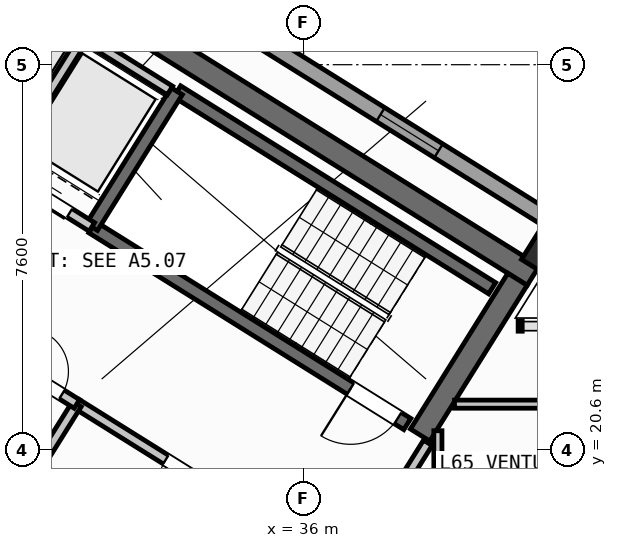
"""IFC4 building model, lengths in metres.
Left out: names, types, materials, properties, quantities, classifications, styles, units other than length and angle.
Written with IfcOpenShell. Run it as: python <this file> out.ifc"""

import sys

from ifc_helpers import new_model, si_unit, direction, frame, frame_2d, origin, origin_2d, place, context, subcontext, project, spatial, rectangle, hollow_rectangle, extrude, source, transform, mapped, element, fill, save


model = new_model("IFC4")
c1 = context("Model", 3, precision=1e-05, world=origin(), true_north=direction((0.0, 1.0)))
c2 = subcontext(c1, "Body", "Model", "MODEL_VIEW")
j1 = project(units=[si_unit("LENGTHUNIT", "METRE"), si_unit("PLANEANGLEUNIT", "RADIAN")], contexts=[c1])
p1 = place(None, origin())
s1 = spatial("IfcSite", under=j1, at=p1, CompositionType="ELEMENT")
p2 = place(p1, origin())
s2 = spatial("IfcBuilding", under=s1, at=p2, CompositionType="ELEMENT")
p3 = place(p2, frame((0.0, 0.0, 259.2)))
s3 = spatial("IfcBuildingStorey", under=s2, at=p3, CompositionType="ELEMENT", Elevation=259.2)
p4 = place(p3, frame((40.531, 24.036, 0.0), z_axis=(0.0, 0.0, 1.0), x_axis=(-0.848048787466, 0.529918157905, 0.0)))
e1 = element("IfcWall", 1, at=p4, inside=s3, PredefinedType="SHEAR", context=c2, shape_type="SweptSolid", body=[
    extrude(rectangle(XDim=13.04, YDim=0.45, at=frame_2d((6.52, 0.0))), origin(), (0.0, 0.0, 1.0), 3.35),
])
p5 = place(p3, frame((40.221, 23.965, 0.0), z_axis=(0.0, 0.0, 1.0), x_axis=(-0.529902075036, -0.848058836916, 0.0)))
e2 = element("IfcWall", 2, at=p5, inside=s3, PredefinedType="SHEAR", context=c2, shape_type="SweptSolid", body=[
    extrude(rectangle(XDim=3.625, YDim=0.45, at=frame_2d((1.812, 0.0))), origin(), (0.0, 0.0, 1.0), 3.35),
])
m1 = source(origin(), c2, "Body", "SweptSolid", [
    extrude(hollow_rectangle(XDim=0.7, YDim=0.7, WallThickness=0.028, at=origin_2d()), origin(), (0.0, 0.0, 1.0), 3.6),
])
p6 = place(p3, frame((40.783, 24.469, 0.0), z_axis=(0.0, 0.0, 1.0), x_axis=(-0.848048096156, 0.529919264233, 0.0)))
e3 = element("IfcColumn", 3, at=p6, inside=s3, PredefinedType="COLUMN", context=c2, shape_type="MappedRepresentation", body=[
    mapped(m1, transform((0.0, 0.0, 0.0), scale=1.0)),
])
p7 = place(p3, frame((14.138, 41.825, 0.0), z_axis=(0.0, 0.0, 1.0), x_axis=(0.848046498049, -0.529921821731, 0.0)))
e4 = element("IfcWall", 4, at=p7, inside=s3, PredefinedType="STANDARD", context=c2, shape_type="SweptSolid", body=[
    extrude(rectangle(XDim=31.588, YDim=0.32, at=frame_2d((15.794, 0.0))), origin(), (0.0, 0.0, 1.0), 3.35),
])
p8 = place(p7, frame((9.753, 0.0, 0.0)))
e5 = element("IfcOpeningElement", 5, at=p8, cuts=e4, PredefinedType="OPENING", context=c2, shape_type="SweptSolid", body=[
    extrude(rectangle(XDim=1.05, YDim=2.15, at=frame_2d((0.525, 1.075))), frame((0.0, 0.17, 0.0), z_axis=(0.0, -1.0, 0.0), x_axis=(1.0, 0.0, 0.0)), (0.0, 0.0, 1.0), 0.34),
])
p9 = place(p7, frame((0.816, 0.0, 0.9)))
e6 = element("IfcOpeningElement", 6, at=p9, cuts=e4, PredefinedType="OPENING", context=c2, shape_type="SweptSolid", body=[
    extrude(rectangle(XDim=1.65, YDim=1.45, at=frame_2d((0.825, 0.725))), frame((0.0, 0.17, 0.0), z_axis=(0.0, -1.0, 0.0), x_axis=(1.0, 0.0, 0.0)), (0.0, 0.0, 1.0), 0.34),
])
p10 = place(p7, frame((4.196, 0.0, 1.0)))
e7 = element("IfcOpeningElement", 7, at=p10, cuts=e4, PredefinedType="OPENING", context=c2, shape_type="SweptSolid", body=[
    extrude(rectangle(XDim=0.9, YDim=1.25, at=frame_2d((0.45, 0.625))), frame((0.0, 0.17, 0.0), z_axis=(0.0, -1.0, 0.0), x_axis=(1.0, 0.0, 0.0)), (0.0, 0.0, 1.0), 0.34),
])
p11 = place(p7, frame((7.188, 0.0, 0.95)))
e8 = element("IfcOpeningElement", 8, at=p11, cuts=e4, PredefinedType="OPENING", context=c2, shape_type="SweptSolid", body=[
    extrude(rectangle(XDim=1.95, YDim=1.35, at=frame_2d((0.975, 0.675))), frame((0.0, 0.17, 0.0), z_axis=(0.0, -1.0, 0.0), x_axis=(1.0, 0.0, 0.0)), (0.0, 0.0, 1.0), 0.34),
])
p12 = place(p7, frame((14.124, 0.0, 1.0)))
e9 = element("IfcOpeningElement", 9, at=p12, cuts=e4, PredefinedType="OPENING", context=c2, shape_type="SweptSolid", body=[
    extrude(rectangle(XDim=0.9, YDim=1.25, at=frame_2d((0.45, 0.625))), frame((0.0, 0.17, 0.0), z_axis=(0.0, -1.0, 0.0), x_axis=(1.0, 0.0, 0.0)), (0.0, 0.0, 1.0), 0.34),
])
p13 = place(p7, frame((17.154, 0.0, 1.0)))
e10 = element("IfcOpeningElement", 10, at=p13, cuts=e4, PredefinedType="OPENING", context=c2, shape_type="SweptSolid", body=[
    extrude(rectangle(XDim=0.9, YDim=1.25, at=frame_2d((0.45, 0.625))), frame((0.0, 0.17, 0.0), z_axis=(0.0, -1.0, 0.0), x_axis=(1.0, 0.0, 0.0)), (0.0, 0.0, 1.0), 0.34),
])
p14 = place(p7, frame((21.869, 0.0, 0.9)))
e11 = element("IfcOpeningElement", 11, at=p14, cuts=e4, PredefinedType="OPENING", context=c2, shape_type="SweptSolid", body=[
    extrude(rectangle(XDim=1.35, YDim=1.45, at=frame_2d((0.675, 0.725))), frame((0.0, 0.17, 0.0), z_axis=(0.0, -1.0, 0.0), x_axis=(1.0, 0.0, 0.0)), (0.0, 0.0, 1.0), 0.34),
])
p15 = place(p7, frame((27.569, 0.0, 0.9)))
e12 = element("IfcOpeningElement", 12, at=p15, cuts=e4, PredefinedType="OPENING", context=c2, shape_type="SweptSolid", body=[
    extrude(rectangle(XDim=1.35, YDim=1.45, at=frame_2d((0.675, 0.725))), frame((0.0, 0.17, 0.0), z_axis=(0.0, -1.0, 0.0), x_axis=(1.0, 0.0, 0.0)), (0.0, 0.0, 1.0), 0.34),
])
p16 = place(p3, frame((31.28, 18.261, 0.0), z_axis=(0.0, 0.0, 1.0), x_axis=(-0.848051618787, 0.529913626805, 0.0)))
e13 = element("IfcWall", 13, at=p16, inside=s3, PredefinedType="SHEAR", context=c2, shape_type="SweptSolid", body=[
    extrude(rectangle(XDim=7.46, YDim=0.26, at=frame_2d((3.73, 0.0))), origin(), (0.0, 0.0, 1.0), 3.35),
])
p17 = place(p16, frame((0.36, 0.0, 0.0)))
e14 = element("IfcOpeningElement", 14, at=p17, cuts=e13, PredefinedType="OPENING", context=c2, shape_type="SweptSolid", body=[
    extrude(rectangle(XDim=0.86, YDim=2.05, at=frame_2d((0.43, 1.025))), frame((0.0, 0.14, 0.0), z_axis=(0.0, -1.0, 0.0), x_axis=(1.0, 0.0, 0.0)), (0.0, 0.0, 1.0), 0.28),
])
p18 = place(p3, frame((39.721, 23.788, 0.0), z_axis=(0.0, 0.0, 1.0), x_axis=(-0.848054434086, 0.529909121291, 0.0)))
e15 = element("IfcWall", 15, at=p18, inside=s3, PredefinedType="SHEAR", context=c2, shape_type="SweptSolid", body=[
    extrude(rectangle(XDim=7.33, YDim=0.26, at=frame_2d((3.665, 0.0))), origin(), (0.0, 0.0, 1.0), 3.35),
])
p19 = place(p3, frame((38.046, 21.108, 0.0), z_axis=(0.0, 0.0, 1.0), x_axis=(-0.848054434086, 0.529909121291, 0.0)))
e16 = element("IfcWall", 16, at=p19, inside=s3, PredefinedType="SHEAR", context=c2, shape_type="SweptSolid", body=[
    extrude(rectangle(XDim=7.33, YDim=0.26, at=frame_2d((3.665, 0.0))), origin(), (0.0, 0.0, 1.0), 3.35),
])
p20 = place(p19, frame((0.22, 0.0, 0.0)))
e17 = element("IfcOpeningElement", 17, at=p20, cuts=e16, PredefinedType="OPENING", context=c2, shape_type="SweptSolid", body=[
    extrude(rectangle(XDim=1.1, YDim=2.1, at=frame_2d((0.55, 1.05))), frame((0.0, 0.14, 0.0), z_axis=(0.0, -1.0, 0.0), x_axis=(1.0, 0.0, 0.0)), (0.0, 0.0, 1.0), 0.28),
])
p21 = place(p3, frame((33.496, 27.677, 0.0), z_axis=(0.0, 0.0, 1.0), x_axis=(-0.529908658664, -0.84805472316, 0.0)))
e18 = element("IfcWall", 18, at=p21, inside=s3, PredefinedType="SHEAR", context=c2, shape_type="SweptSolid", body=[
    extrude(rectangle(XDim=3.16, YDim=0.26, at=frame_2d((1.58, 0.0))), origin(), (0.0, 0.0, 1.0), 3.35),
])
p22 = place(p3, frame((36.459, 18.421, 0.0), z_axis=(0.0, 0.0, 1.0), x_axis=(-0.848059591691, 0.529900867089, 0.0)))
e19 = element("IfcWall", 19, at=p22, inside=s3, PredefinedType="STANDARD", context=c2, shape_type="SweptSolid", body=[
    extrude(rectangle(XDim=5.818, YDim=0.2, at=frame_2d((2.909, 0.0))), origin(), (0.0, 0.0, 1.0), 3.34),
])
p23 = place(p22, frame((2.598, 0.0, 0.0)))
e20 = element("IfcOpeningElement", 20, at=p23, cuts=e19, PredefinedType="OPENING", context=c2, shape_type="SweptSolid", body=[
    extrude(rectangle(XDim=1.15, YDim=2.1, at=frame_2d((0.575, 1.05))), frame((0.0, 0.11, 0.0), z_axis=(0.0, -1.0, 0.0), x_axis=(1.0, 0.0, 0.0)), (0.0, 0.0, 1.0), 0.22),
])
p24 = place(p3, frame((31.822, 24.998, 0.0), z_axis=(0.0, 0.0, 1.0), x_axis=(-0.848054125777, 0.529909614701, 0.0)))
e21 = element("IfcWall", 21, at=p24, inside=s3, PredefinedType="STANDARD", context=c2, shape_type="SweptSolid", body=[
    extrude(rectangle(XDim=4.668, YDim=0.2, at=frame_2d((2.334, 0.0))), origin(), (0.0, 0.0, 1.0), 3.34),
])
p25 = place(p24, frame((0.52, 0.0, 0.0)))
e22 = element("IfcOpeningElement", 22, at=p25, cuts=e21, PredefinedType="OPENING", context=c2, shape_type="SweptSolid", body=[
    extrude(rectangle(XDim=1.2, YDim=2.15, at=frame_2d((0.6, 1.075))), frame((0.0, 0.11, 0.0), z_axis=(0.0, -1.0, 0.0), x_axis=(1.0, 0.0, 0.0)), (0.0, 0.0, 1.0), 0.22),
])
p26 = place(p24, frame((2.54, 0.0, 0.0)))
e23 = element("IfcOpeningElement", 23, at=p26, cuts=e21, PredefinedType="OPENING", context=c2, shape_type="SweptSolid", body=[
    extrude(rectangle(XDim=1.2, YDim=2.15, at=frame_2d((0.6, 1.075))), frame((0.0, 0.11, 0.0), z_axis=(0.0, -1.0, 0.0), x_axis=(1.0, 0.0, 0.0)), (0.0, 0.0, 1.0), 0.22),
])
p27 = place(p3, frame((31.645, 28.716, 0.0), z_axis=(0.0, 0.0, 1.0), x_axis=(-0.52986693015, -0.848080795876, 0.0)))
e24 = element("IfcWall", 24, at=p27, inside=s3, PredefinedType="STANDARD", context=c2, shape_type="SweptSolid", body=[
    extrude(rectangle(XDim=2.66, YDim=0.2, at=frame_2d((1.33, 0.0))), origin(), (0.0, 0.0, 1.0), 3.34),
])
p28 = place(p3, frame((33.363, 27.69, 0.0), z_axis=(0.0, 0.0, 1.0), x_axis=(-0.84804957148, 0.529916903215, 0.0)))
e25 = element("IfcWall", 25, at=p28, inside=s3, PredefinedType="STANDARD", context=c2, shape_type="SweptSolid", body=[
    extrude(rectangle(XDim=4.548, YDim=0.2, at=frame_2d((2.274, 0.0))), origin(), (0.0, 0.0, 1.0), 3.34),
])
p29 = place(p3, frame((31.525, 21.504, 0.0), z_axis=(0.0, 0.0, 1.0), x_axis=(-0.529907497854, -0.848055448493, 0.0)))
e26 = element("IfcWall", 26, at=p29, inside=s3, PredefinedType="STANDARD", context=c2, shape_type="SweptSolid", body=[
    extrude(rectangle(XDim=2.88, YDim=0.2, at=frame_2d((1.44, 0.0))), origin(), (0.0, 0.0, 1.0), 3.34),
])
p30 = place(p3, frame((31.525, 21.504, 0.0), z_axis=(0.0, 0.0, 1.0), x_axis=(-0.848042066329, 0.529928913853, 0.0)))
e27 = element("IfcWall", 27, at=p30, inside=s3, PredefinedType="STANDARD", context=c2, shape_type="SweptSolid", body=[
    extrude(rectangle(XDim=6.268, YDim=0.2, at=frame_2d((3.134, 0.0))), origin(), (0.0, 0.0, 1.0), 3.34),
])
p31 = place(p30, frame((4.4, 0.0, 0.0)))
e28 = element("IfcOpeningElement", 28, at=p31, cuts=e27, PredefinedType="OPENING", context=c2, shape_type="SweptSolid", body=[
    extrude(rectangle(XDim=0.86, YDim=2.05, at=frame_2d((0.43, 1.025))), frame((0.0, 0.11, 0.0), z_axis=(0.0, -1.0, 0.0), x_axis=(1.0, 0.0, 0.0)), (0.0, 0.0, 1.0), 0.22),
])
p32 = place(p30, frame((0.35, 0.0, 0.0)))
e29 = element("IfcOpeningElement", 29, at=p32, cuts=e27, PredefinedType="OPENING", context=c2, shape_type="SweptSolid", body=[
    extrude(rectangle(XDim=0.86, YDim=2.05, at=frame_2d((0.43, 1.025))), frame((0.0, 0.11, 0.0), z_axis=(0.0, -1.0, 0.0), x_axis=(1.0, 0.0, 0.0)), (0.0, 0.0, 1.0), 0.22),
])
p33 = place(p3, frame((38.451, 20.737, 0.0), z_axis=(0.0, 0.0, 1.0), x_axis=(-0.529924799939, -0.848044637038, 0.0)))
e30 = element("IfcWall", 30, at=p33, inside=s3, PredefinedType="STANDARD", context=c2, shape_type="SweptSolid", body=[
    extrude(rectangle(XDim=2.96, YDim=0.2, at=frame_2d((1.48, 0.0))), origin(), (0.0, 0.0, 1.0), 3.34),
])
p34 = place(p33, frame((1.46, 0.0, 0.0)))
e31 = element("IfcOpeningElement", 31, at=p34, cuts=e30, PredefinedType="OPENING", context=c2, shape_type="SweptSolid", body=[
    extrude(rectangle(XDim=0.86, YDim=2.05, at=frame_2d((0.43, 1.025))), frame((0.0, 0.11, 0.0), z_axis=(0.0, -1.0, 0.0), x_axis=(1.0, 0.0, 0.0)), (0.0, 0.0, 1.0), 0.22),
])
p35 = place(p3, frame((38.65, 17.93, 0.0), z_axis=(0.0, 0.0, 1.0), x_axis=(0.0, 1.0, 0.0)))
e32 = element("IfcWall", 32, at=p35, inside=s3, PredefinedType="PARTITIONING", context=c2, shape_type="SweptSolid", body=[
    extrude(rectangle(XDim=3.046, YDim=0.16, at=frame_2d((1.523, 0.0))), origin(), (0.0, 0.0, 1.0), 3.34),
])
p36 = place(p3, frame((38.978, 21.5, 0.0), z_axis=(0.0, 0.0, 1.0), x_axis=(1.0, 0.0, 0.0)))
e33 = element("IfcWall", 33, at=p36, inside=s3, PredefinedType="PARTITIONING", context=c2, shape_type="SweptSolid", body=[
    extrude(rectangle(XDim=7.336, YDim=0.16, at=frame_2d((3.668, 0.0))), origin(), (0.0, 0.0, 1.0), 3.34),
])
m2 = source(origin(), c2, "Body", "SweptSolid", [
    extrude(rectangle(XDim=1.35, YDim=1.45, at=frame_2d((0.675, 0.725))), frame((0.0, 0.03, 0.0), z_axis=(0.0, -1.0, 0.0), x_axis=(1.0, 0.0, 0.0)), (0.0, 0.0, 1.0), 0.06),
])
p37 = place(p15, origin())
e34 = element("IfcWindow", 34, at=p37, inside=s3, PartitioningType="SINGLE_PANEL", PredefinedType="WINDOW", context=c2, shape_type="MappedRepresentation", body=[
    mapped(m2, transform((0.0, 0.0, 0.0), scale=1.0)),
])
fill(e12, e34)
m3 = source(origin(), c2, "Body", "SweptSolid", [
    extrude(rectangle(XDim=1.1, YDim=2.1, at=frame_2d((0.55, 1.05))), frame((0.0, 0.025, 0.0), z_axis=(0.0, -1.0, 0.0), x_axis=(1.0, 0.0, 0.0)), (0.0, 0.0, 1.0), 0.05),
])
p38 = place(p20, origin())
e35 = element("IfcDoor", 35, at=p38, inside=s3, OperationType="SINGLE_SWING_RIGHT", PredefinedType="DOOR", context=c2, shape_type="MappedRepresentation", body=[
    mapped(m3, transform((0.0, 0.0, 0.0), scale=1.0)),
])
fill(e17, e35)
m4 = source(origin(), c2, "Body", "SweptSolid", [
    extrude(rectangle(XDim=1.15, YDim=2.1, at=frame_2d((0.575, 1.05))), frame((0.0, 0.025, 0.0), z_axis=(0.0, -1.0, 0.0), x_axis=(1.0, 0.0, 0.0)), (0.0, 0.0, 1.0), 0.05),
])
p39 = place(p23, origin())
e36 = element("IfcDoor", 36, at=p39, inside=s3, OperationType="SINGLE_SWING_LEFT", PredefinedType="DOOR", context=c2, shape_type="MappedRepresentation", body=[
    mapped(m4, transform((0.0, 0.0, 0.0), scale=1.0)),
])
fill(e20, e36)
m5 = source(origin(), c2, "Body", "SweptSolid", [
    extrude(rectangle(XDim=1.2, YDim=2.15, at=frame_2d((0.6, 1.075))), frame((0.0, 0.025, 0.0), z_axis=(0.0, -1.0, 0.0), x_axis=(1.0, 0.0, 0.0)), (0.0, 0.0, 1.0), 0.05),
])
p40 = place(p25, origin())
e37 = element("IfcDoor", 37, at=p40, inside=s3, OperationType="DOUBLE_DOOR_SLIDING", PredefinedType="DOOR", context=c2, shape_type="MappedRepresentation", body=[
    mapped(m5, transform((0.0, 0.0, 0.0), scale=1.0)),
])
fill(e22, e37)
m6 = source(origin(), c2, "Body", "SweptSolid", [
    extrude(rectangle(XDim=0.86, YDim=2.05, at=frame_2d((0.43, 1.025))), frame((0.0, 0.025, 0.0), z_axis=(0.0, -1.0, 0.0), x_axis=(1.0, 0.0, 0.0)), (0.0, 0.0, 1.0), 0.05),
])
p41 = place(p32, frame((0.86, 0.0, 0.0), z_axis=(0.0, 0.0, 1.0), x_axis=(-1.0, 0.0, 0.0)))
e38 = element("IfcDoor", 38, at=p41, inside=s3, OperationType="SINGLE_SWING_LEFT", PredefinedType="DOOR", context=c2, shape_type="MappedRepresentation", body=[
    mapped(m6, transform((0.0, 0.0, 0.0), scale=1.0)),
])
fill(e29, e38)
save(model, sys.argv[1])
